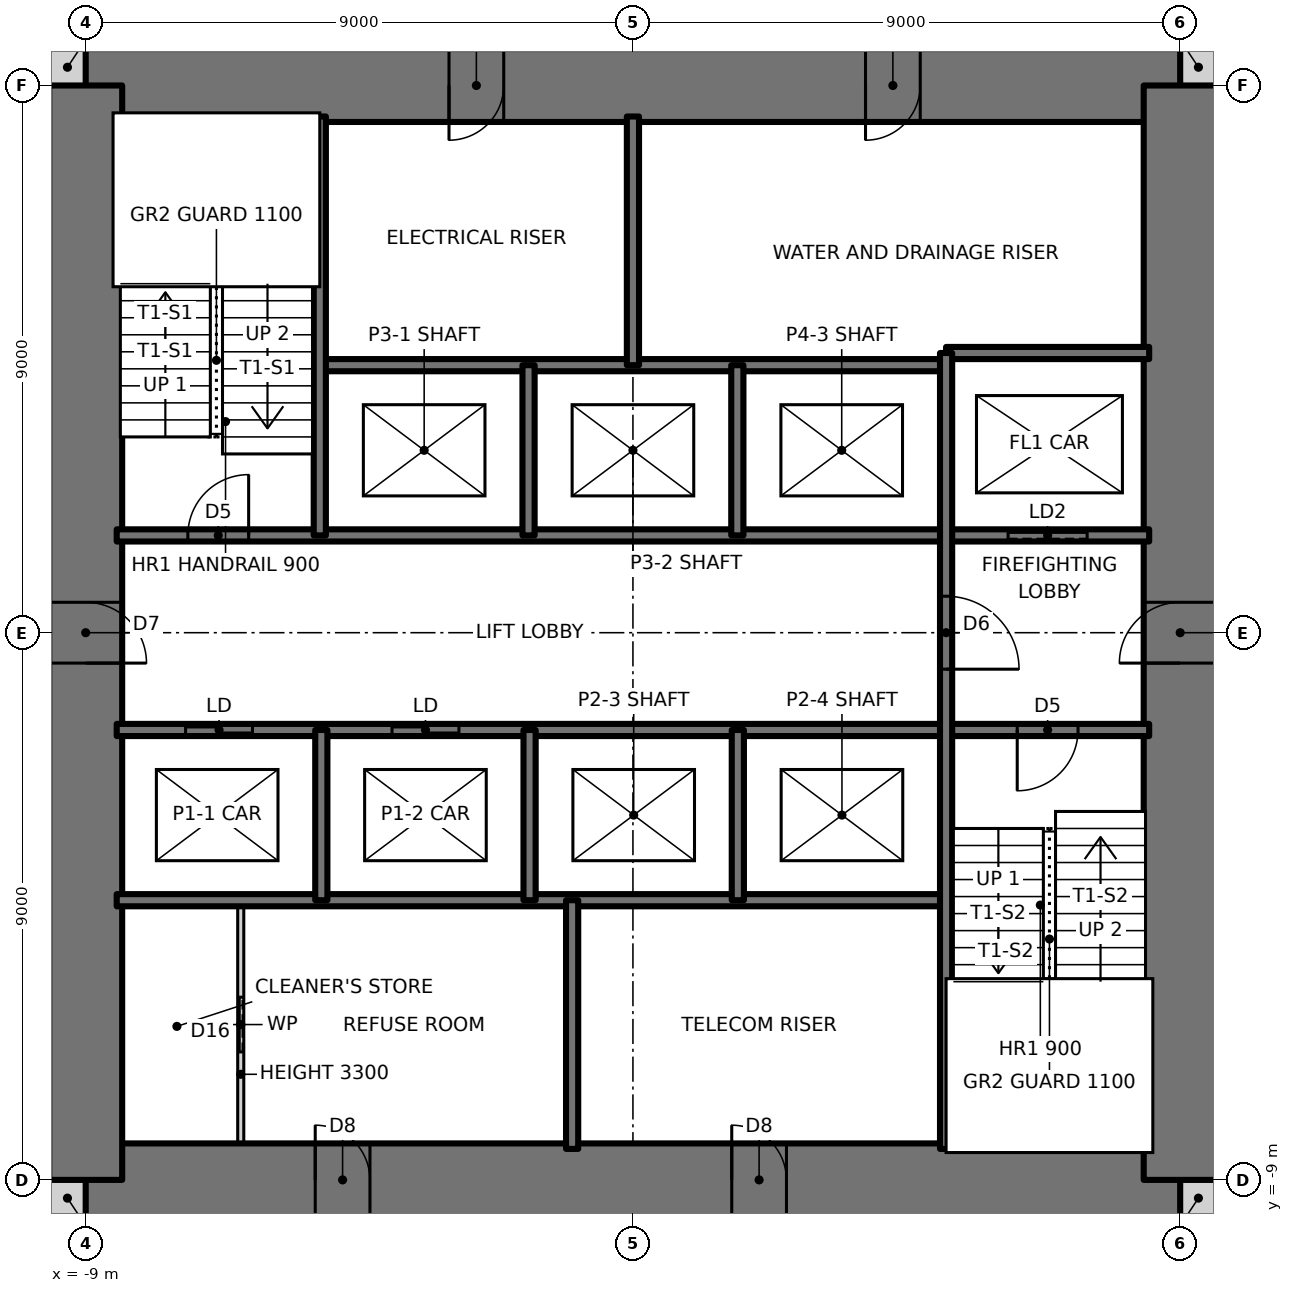
"""IFC4 building model, lengths in metres.
Left out: names, types, materials, properties, quantities, classifications, styles, units other than length and angle.
Written with IfcOpenShell. Run it as: python <this file> out.ifc"""

import sys

from ifc_helpers import new_model, si_unit, direction, frame, frame_2d, origin, place, context, subcontext, project, spatial, rectangle, extrude, element, fill, save


model = new_model("IFC4")
c1 = context("Model", 3, precision=1e-05, world=origin(), true_north=direction((0.0, 1.0)))
c2 = subcontext(c1, "Body", "Model", "MODEL_VIEW")
j1 = project(units=[si_unit("LENGTHUNIT", "METRE"), si_unit("PLANEANGLEUNIT", "RADIAN")], contexts=[c1])
p1 = place(None, origin())
s1 = spatial("IfcSite", under=j1, at=p1, CompositionType="ELEMENT")
p2 = place(p1, origin())
s2 = spatial("IfcBuilding", under=s1, at=p2, CompositionType="ELEMENT")
p3 = place(p2, frame((0.0, 0.0, 46.5)))
s3 = spatial("IfcBuildingStorey", under=s2, at=p3, CompositionType="ELEMENT", Elevation=46.5)
for number, where, z_axis, x_axis in (
    (1, (-9.6, -9.3, 0.0), (0.0, 0.0, 1.0), (1.0, 0.0, 0.0)),
    (2, (9.0, -9.3, 0.0), (0.0, 0.0, 1.0), (1.0, 0.0, 0.0)),
    (3, (9.0, 9.3, 0.0), (0.0, 0.0, 1.0), (1.0, 0.0, 0.0)),
    (4, (-9.6, 9.3, 0.0), (0.0, 0.0, 1.0), (1.0, 0.0, 0.0)),
):
    element("IfcWall", number, at=place(p3, frame(where, z_axis=z_axis, x_axis=x_axis)), inside=s3, PredefinedType="SOLIDWALL", context=c2, shape_type="SweptSolid", body=[
        extrude(rectangle(XDim=0.6, YDim=0.6, at=frame_2d((0.3, 0.0))), origin(), (0.0, 0.0, 1.0), 3.5),
    ])
p4 = place(p3, frame((-9.0, -9.0, 0.0), z_axis=(0.0, 0.0, 1.0), x_axis=(1.0, 0.0, 0.0)))
e5 = element("IfcWall", 5, at=p4, inside=s3, PredefinedType="SHEAR", context=c2, shape_type="SweptSolid", body=[
    extrude(rectangle(XDim=18.0, YDim=1.2, at=frame_2d((9.0, 0.0))), origin(), (0.0, 0.0, 1.0), 3.5),
])
p5 = place(p4, frame((3.775, 0.0, 0.0)))
e6 = element("IfcOpeningElement", 6, at=p5, cuts=e5, PredefinedType="OPENING", context=c2, shape_type="SweptSolid", body=[
    extrude(rectangle(XDim=0.9, YDim=2.1, at=frame_2d((0.45, 1.05))), frame((0.0, 0.61, 0.0), z_axis=(0.0, -1.0, 0.0), x_axis=(1.0, 0.0, 0.0)), (0.0, 0.0, 1.0), 1.22),
])
p6 = place(p4, frame((10.625, 0.0, 0.0)))
e7 = element("IfcOpeningElement", 7, at=p6, cuts=e5, PredefinedType="OPENING", context=c2, shape_type="SweptSolid", body=[
    extrude(rectangle(XDim=0.9, YDim=2.1, at=frame_2d((0.45, 1.05))), frame((0.0, 0.61, 0.0), z_axis=(0.0, -1.0, 0.0), x_axis=(1.0, 0.0, 0.0)), (0.0, 0.0, 1.0), 1.22),
])
p7 = place(p3, frame((9.0, 9.0, 0.0), z_axis=(0.0, 0.0, 1.0), x_axis=(-1.0, 0.0, 0.0)))
e8 = element("IfcWall", 8, at=p7, inside=s3, PredefinedType="SHEAR", context=c2, shape_type="SweptSolid", body=[
    extrude(rectangle(XDim=18.0, YDim=1.2, at=frame_2d((9.0, 0.0))), origin(), (0.0, 0.0, 1.0), 3.5),
])
p8 = place(p7, frame((11.125, 0.0, 0.0)))
e9 = element("IfcOpeningElement", 9, at=p8, cuts=e8, PredefinedType="OPENING", context=c2, shape_type="SweptSolid", body=[
    extrude(rectangle(XDim=0.9, YDim=2.1, at=frame_2d((0.45, 1.05))), frame((0.0, 0.61, 0.0), z_axis=(0.0, -1.0, 0.0), x_axis=(1.0, 0.0, 0.0)), (0.0, 0.0, 1.0), 1.22),
])
p9 = place(p7, frame((4.275, 0.0, 0.0)))
e10 = element("IfcOpeningElement", 10, at=p9, cuts=e8, PredefinedType="OPENING", context=c2, shape_type="SweptSolid", body=[
    extrude(rectangle(XDim=0.9, YDim=2.1, at=frame_2d((0.45, 1.05))), frame((0.0, 0.61, 0.0), z_axis=(0.0, -1.0, 0.0), x_axis=(1.0, 0.0, 0.0)), (0.0, 0.0, 1.0), 1.22),
])
p10 = place(p3, frame((9.0, -9.0, 0.0), z_axis=(0.0, 0.0, 1.0), x_axis=(0.0, 1.0, 0.0)))
e11 = element("IfcWall", 11, at=p10, inside=s3, PredefinedType="SHEAR", context=c2, shape_type="SweptSolid", body=[
    extrude(rectangle(XDim=18.0, YDim=1.2, at=frame_2d((9.0, 0.0))), origin(), (0.0, 0.0, 1.0), 3.5),
])
p11 = place(p10, frame((8.5, 0.0, 0.0)))
e12 = element("IfcOpeningElement", 12, at=p11, cuts=e11, PredefinedType="OPENING", context=c2, shape_type="SweptSolid", body=[
    extrude(rectangle(XDim=1.0, YDim=2.1, at=frame_2d((0.5, 1.05))), frame((0.0, 0.61, 0.0), z_axis=(0.0, -1.0, 0.0), x_axis=(1.0, 0.0, 0.0)), (0.0, 0.0, 1.0), 1.22),
])
p12 = place(p3, frame((-9.0, 9.0, 0.0), z_axis=(0.0, 0.0, 1.0), x_axis=(0.0, -1.0, 0.0)))
e13 = element("IfcWall", 13, at=p12, inside=s3, PredefinedType="SHEAR", context=c2, shape_type="SweptSolid", body=[
    extrude(rectangle(XDim=18.0, YDim=1.2, at=frame_2d((9.0, 0.0))), origin(), (0.0, 0.0, 1.0), 3.5),
])
p13 = place(p12, frame((8.5, 0.0, 0.0)))
e14 = element("IfcOpeningElement", 14, at=p13, cuts=e13, PredefinedType="OPENING", context=c2, shape_type="SweptSolid", body=[
    extrude(rectangle(XDim=1.0, YDim=2.1, at=frame_2d((0.5, 1.05))), frame((0.0, 0.61, 0.0), z_axis=(0.0, -1.0, 0.0), x_axis=(1.0, 0.0, 0.0)), (0.0, 0.0, 1.0), 1.22),
])
p14 = place(p3, frame((-8.49, -4.4, 0.0), z_axis=(0.0, 0.0, 1.0), x_axis=(1.0, 0.0, 0.0)))
e15 = element("IfcWall", 15, at=p14, inside=s3, PredefinedType="SOLIDWALL", context=c2, shape_type="SweptSolid", body=[
    extrude(rectangle(XDim=13.64, YDim=0.2, at=frame_2d((6.82, 0.0))), origin(), (0.0, 0.0, 1.0), 3.5),
])
p15 = place(p3, frame((-8.49, -1.6, 0.0), z_axis=(0.0, 0.0, 1.0), x_axis=(1.0, 0.0, 0.0)))
e16 = element("IfcWall", 16, at=p15, inside=s3, PredefinedType="SOLIDWALL", context=c2, shape_type="SweptSolid", body=[
    extrude(rectangle(XDim=16.98, YDim=0.2, at=frame_2d((8.49, 0.0))), origin(), (0.0, 0.0, 1.0), 3.5),
])
p16 = place(p15, frame((14.81, 0.0, 0.0)))
e17 = element("IfcOpeningElement", 17, at=p16, cuts=e16, PredefinedType="OPENING", context=c2, shape_type="SweptSolid", body=[
    extrude(rectangle(XDim=1.0, YDim=2.1, at=frame_2d((0.5, 1.05))), frame((0.0, 0.11, 0.0), z_axis=(0.0, -1.0, 0.0), x_axis=(1.0, 0.0, 0.0)), (0.0, 0.0, 1.0), 0.22),
])
p17 = place(p15, frame((1.133, 0.0, 0.0)))
e18 = element("IfcOpeningElement", 18, at=p17, cuts=e16, PredefinedType="OPENING", context=c2, shape_type="SweptSolid", body=[
    extrude(rectangle(XDim=1.1, YDim=2.1, at=frame_2d((0.55, 1.05))), frame((0.0, 0.11, 0.0), z_axis=(0.0, -1.0, 0.0), x_axis=(1.0, 0.0, 0.0)), (0.0, 0.0, 1.0), 0.22),
])
p18 = place(p15, frame((4.528, 0.0, 0.0)))
e19 = element("IfcOpeningElement", 19, at=p18, cuts=e16, PredefinedType="OPENING", context=c2, shape_type="SweptSolid", body=[
    extrude(rectangle(XDim=1.1, YDim=2.1, at=frame_2d((0.55, 1.05))), frame((0.0, 0.11, 0.0), z_axis=(0.0, -1.0, 0.0), x_axis=(1.0, 0.0, 0.0)), (0.0, 0.0, 1.0), 0.22),
])
p19 = place(p3, frame((-8.49, 1.6, 0.0), z_axis=(0.0, 0.0, 1.0), x_axis=(1.0, 0.0, 0.0)))
e20 = element("IfcWall", 20, at=p19, inside=s3, PredefinedType="SOLIDWALL", context=c2, shape_type="SweptSolid", body=[
    extrude(rectangle(XDim=16.98, YDim=0.2, at=frame_2d((8.49, 0.0))), origin(), (0.0, 0.0, 1.0), 3.5),
])
p20 = place(p19, frame((1.17, 0.0, 0.0)))
e21 = element("IfcOpeningElement", 21, at=p20, cuts=e20, PredefinedType="OPENING", context=c2, shape_type="SweptSolid", body=[
    extrude(rectangle(XDim=1.0, YDim=2.1, at=frame_2d((0.5, 1.05))), frame((0.0, 0.11, 0.0), z_axis=(0.0, -1.0, 0.0), x_axis=(1.0, 0.0, 0.0)), (0.0, 0.0, 1.0), 0.22),
])
p21 = place(p19, frame((14.66, 0.0, 0.0)))
e22 = element("IfcOpeningElement", 22, at=p21, cuts=e20, PredefinedType="OPENING", context=c2, shape_type="SweptSolid", body=[
    extrude(rectangle(XDim=1.3, YDim=2.1, at=frame_2d((0.65, 1.05))), frame((0.0, 0.11, 0.0), z_axis=(0.0, -1.0, 0.0), x_axis=(1.0, 0.0, 0.0)), (0.0, 0.0, 1.0), 0.22),
])
p22 = place(p3, frame((-5.15, 4.4, 0.0), z_axis=(0.0, 0.0, 1.0), x_axis=(1.0, 0.0, 0.0)))
e23 = element("IfcWall", 23, at=p22, inside=s3, PredefinedType="SOLIDWALL", context=c2, shape_type="SweptSolid", body=[
    extrude(rectangle(XDim=10.3, YDim=0.2, at=frame_2d((5.15, 0.0))), origin(), (0.0, 0.0, 1.0), 3.5),
])
p23 = place(p3, frame((5.15, 4.6, 0.0), z_axis=(0.0, 0.0, 1.0), x_axis=(1.0, 0.0, 0.0)))
e24 = element("IfcWall", 24, at=p23, inside=s3, PredefinedType="SOLIDWALL", context=c2, shape_type="SweptSolid", body=[
    extrude(rectangle(XDim=3.34, YDim=0.2, at=frame_2d((1.67, 0.0))), origin(), (0.0, 0.0, 1.0), 3.5),
])
p24 = place(p3, frame((5.15, -8.49, 0.0), z_axis=(0.0, 0.0, 1.0), x_axis=(0.0, 1.0, 0.0)))
e25 = element("IfcWall", 25, at=p24, inside=s3, PredefinedType="SOLIDWALL", context=c2, shape_type="SweptSolid", body=[
    extrude(rectangle(XDim=13.09, YDim=0.2, at=frame_2d((6.545, 0.0))), origin(), (0.0, 0.0, 1.0), 3.5),
])
p25 = place(p24, frame((7.89, 0.0, 0.0)))
e26 = element("IfcOpeningElement", 26, at=p25, cuts=e25, PredefinedType="OPENING", context=c2, shape_type="SweptSolid", body=[
    extrude(rectangle(XDim=1.2, YDim=2.1, at=frame_2d((0.6, 1.05))), frame((0.0, 0.11, 0.0), z_axis=(0.0, -1.0, 0.0), x_axis=(1.0, 0.0, 0.0)), (0.0, 0.0, 1.0), 0.22),
])
for number, where, z_axis, x_axis in (
    (27, (1.725, -4.4, 0.0), (0.0, 0.0, 1.0), (0.0, 1.0, 0.0)),
    (28, (1.717, 1.6, 0.0), (0.0, 0.0, 1.0), (0.0, 1.0, 0.0)),
):
    element("IfcWall", number, at=place(p3, frame(where, z_axis=z_axis, x_axis=x_axis)), inside=s3, PredefinedType="SOLIDWALL", context=c2, shape_type="SweptSolid", body=[
        extrude(rectangle(XDim=2.8, YDim=0.2, at=frame_2d((1.4, 0.0))), origin(), (0.0, 0.0, 1.0), 3.5),
    ])
for number, where, z_axis, x_axis in (
    (29, (0.0, 4.4, 0.0), (0.0, 0.0, 1.0), (0.0, 1.0, 0.0)),
    (30, (-1.0, -8.49, 0.0), (0.0, 0.0, 1.0), (0.0, 1.0, 0.0)),
):
    element("IfcWall", number, at=place(p3, frame(where, z_axis=z_axis, x_axis=x_axis)), inside=s3, PredefinedType="SOLIDWALL", context=c2, shape_type="SweptSolid", body=[
        extrude(rectangle(XDim=4.09, YDim=0.2, at=frame_2d((2.045, 0.0))), origin(), (0.0, 0.0, 1.0), 3.5),
    ])
for number, where, z_axis, x_axis in (
    (31, (-1.7, -4.4, 0.0), (0.0, 0.0, 1.0), (0.0, 1.0, 0.0)),
    (32, (-1.717, 1.6, 0.0), (0.0, 0.0, 1.0), (0.0, 1.0, 0.0)),
    (33, (-5.125, -4.4, 0.0), (0.0, 0.0, 1.0), (0.0, 1.0, 0.0)),
):
    element("IfcWall", number, at=place(p3, frame(where, z_axis=z_axis, x_axis=x_axis)), inside=s3, PredefinedType="SOLIDWALL", context=c2, shape_type="SweptSolid", body=[
        extrude(rectangle(XDim=2.8, YDim=0.2, at=frame_2d((1.4, 0.0))), origin(), (0.0, 0.0, 1.0), 3.5),
    ])
p26 = place(p3, frame((-5.15, 1.6, 0.0), z_axis=(0.0, 0.0, 1.0), x_axis=(0.0, 1.0, 0.0)))
e34 = element("IfcWall", 34, at=p26, inside=s3, PredefinedType="SOLIDWALL", context=c2, shape_type="SweptSolid", body=[
    extrude(rectangle(XDim=6.89, YDim=0.2, at=frame_2d((3.445, 0.0))), origin(), (0.0, 0.0, 1.0), 3.5),
])
p27 = place(p3, frame((-6.45, -8.49, 0.0), z_axis=(0.0, 0.0, 1.0), x_axis=(0.0, 1.0, 0.0)))
e35 = element("IfcWall", 35, at=p27, inside=s3, PredefinedType="PARTITIONING", context=c2, shape_type="SweptSolid", body=[
    extrude(rectangle(XDim=4.09, YDim=0.1, at=frame_2d((2.045, 0.0))), origin(), (0.0, 0.0, 1.0), 3.3),
])
p28 = place(p27, frame((1.595, 0.0, 0.0)))
e36 = element("IfcOpeningElement", 36, at=p28, cuts=e35, PredefinedType="OPENING", context=c2, shape_type="SweptSolid", body=[
    extrude(rectangle(XDim=0.9, YDim=2.1, at=frame_2d((0.45, 1.05))), frame((0.0, 0.06, 0.0), z_axis=(0.0, -1.0, 0.0), x_axis=(1.0, 0.0, 0.0)), (0.0, 0.0, 1.0), 0.12),
])
p29 = place(p20, origin())
e37 = element("IfcDoor", 37, at=p29, inside=s3, OperationType="SINGLE_SWING_RIGHT", PredefinedType="DOOR", context=c2, shape_type="SweptSolid", body=[
    extrude(rectangle(XDim=1.0, YDim=2.1, at=frame_2d((0.5, 1.05))), frame((0.0, 0.025, 0.0), z_axis=(0.0, -1.0, 0.0), x_axis=(1.0, 0.0, 0.0)), (0.0, 0.0, 1.0), 0.05),
])
fill(e21, e37)
p30 = place(p16, frame((1.0, 0.0, 0.0), z_axis=(0.0, 0.0, 1.0), x_axis=(-1.0, 0.0, 0.0)))
e38 = element("IfcDoor", 38, at=p30, inside=s3, OperationType="SINGLE_SWING_RIGHT", PredefinedType="DOOR", context=c2, shape_type="SweptSolid", body=[
    extrude(rectangle(XDim=1.0, YDim=2.1, at=frame_2d((0.5, 1.05))), frame((0.0, 0.025, 0.0), z_axis=(0.0, -1.0, 0.0), x_axis=(1.0, 0.0, 0.0)), (0.0, 0.0, 1.0), 0.05),
])
fill(e17, e38)
p31 = place(p25, frame((1.2, 0.0, 0.0), z_axis=(0.0, 0.0, 1.0), x_axis=(-1.0, 0.0, 0.0)))
e39 = element("IfcDoor", 39, at=p31, inside=s3, OperationType="SINGLE_SWING_RIGHT", PredefinedType="DOOR", context=c2, shape_type="SweptSolid", body=[
    extrude(rectangle(XDim=1.2, YDim=2.1, at=frame_2d((0.6, 1.05))), frame((0.0, 0.025, 0.0), z_axis=(0.0, -1.0, 0.0), x_axis=(1.0, 0.0, 0.0)), (0.0, 0.0, 1.0), 0.05),
])
fill(e26, e39)
p32 = place(p28, origin())
e40 = element("IfcDoor", 40, at=p32, inside=s3, OperationType="SLIDING_TO_LEFT", PredefinedType="DOOR", context=c2, shape_type="SweptSolid", body=[
    extrude(rectangle(XDim=0.9, YDim=2.1, at=frame_2d((0.45, 1.05))), frame((0.0, 0.025, 0.0), z_axis=(0.0, -1.0, 0.0), x_axis=(1.0, 0.0, 0.0)), (0.0, 0.0, 1.0), 0.05),
])
fill(e36, e40)
p33 = place(p13, origin())
e41 = element("IfcDoor", 41, at=p33, inside=s3, OperationType="SINGLE_SWING_RIGHT", PredefinedType="DOOR", context=c2, shape_type="SweptSolid", body=[
    extrude(rectangle(XDim=1.0, YDim=2.1, at=frame_2d((0.5, 1.05))), frame((0.0, 0.025, 0.0), z_axis=(0.0, -1.0, 0.0), x_axis=(1.0, 0.0, 0.0)), (0.0, 0.0, 1.0), 0.05),
])
fill(e14, e41)
p34 = place(p11, origin())
e42 = element("IfcDoor", 42, at=p34, inside=s3, OperationType="SINGLE_SWING_LEFT", PredefinedType="DOOR", context=c2, shape_type="SweptSolid", body=[
    extrude(rectangle(XDim=1.0, YDim=2.1, at=frame_2d((0.5, 1.05))), frame((0.0, 0.025, 0.0), z_axis=(0.0, -1.0, 0.0), x_axis=(1.0, 0.0, 0.0)), (0.0, 0.0, 1.0), 0.05),
])
fill(e12, e42)
p35 = place(p8, origin())
e43 = element("IfcDoor", 43, at=p35, inside=s3, OperationType="SINGLE_SWING_RIGHT", PredefinedType="DOOR", context=c2, shape_type="SweptSolid", body=[
    extrude(rectangle(XDim=0.9, YDim=2.1, at=frame_2d((0.45, 1.05))), frame((0.0, 0.025, 0.0), z_axis=(0.0, -1.0, 0.0), x_axis=(1.0, 0.0, 0.0)), (0.0, 0.0, 1.0), 0.05),
])
fill(e9, e43)
p36 = place(p9, origin())
e44 = element("IfcDoor", 44, at=p36, inside=s3, OperationType="SINGLE_SWING_RIGHT", PredefinedType="DOOR", context=c2, shape_type="SweptSolid", body=[
    extrude(rectangle(XDim=0.9, YDim=2.1, at=frame_2d((0.45, 1.05))), frame((0.0, 0.025, 0.0), z_axis=(0.0, -1.0, 0.0), x_axis=(1.0, 0.0, 0.0)), (0.0, 0.0, 1.0), 0.05),
])
fill(e10, e44)
p37 = place(p5, origin())
e45 = element("IfcDoor", 45, at=p37, inside=s3, OperationType="SINGLE_SWING_LEFT", PredefinedType="DOOR", context=c2, shape_type="SweptSolid", body=[
    extrude(rectangle(XDim=0.9, YDim=2.1, at=frame_2d((0.45, 1.05))), frame((0.0, 0.025, 0.0), z_axis=(0.0, -1.0, 0.0), x_axis=(1.0, 0.0, 0.0)), (0.0, 0.0, 1.0), 0.05),
])
fill(e6, e45)
p38 = place(p6, origin())
e46 = element("IfcDoor", 46, at=p38, inside=s3, OperationType="SINGLE_SWING_LEFT", PredefinedType="DOOR", context=c2, shape_type="SweptSolid", body=[
    extrude(rectangle(XDim=0.9, YDim=2.1, at=frame_2d((0.45, 1.05))), frame((0.0, 0.025, 0.0), z_axis=(0.0, -1.0, 0.0), x_axis=(1.0, 0.0, 0.0)), (0.0, 0.0, 1.0), 0.05),
])
fill(e7, e46)
p39 = place(p17, origin())
e47 = element("IfcDoor", 47, at=p39, inside=s3, OperationType="DOUBLE_DOOR_SLIDING", PredefinedType="DOOR", context=c2, shape_type="SweptSolid", body=[
    extrude(rectangle(XDim=1.1, YDim=2.1, at=frame_2d((0.55, 1.05))), frame((0.0, 0.025, 0.0), z_axis=(0.0, -1.0, 0.0), x_axis=(1.0, 0.0, 0.0)), (0.0, 0.0, 1.0), 0.05),
])
fill(e18, e47)
p40 = place(p18, origin())
e48 = element("IfcDoor", 48, at=p40, inside=s3, OperationType="DOUBLE_DOOR_SLIDING", PredefinedType="DOOR", context=c2, shape_type="SweptSolid", body=[
    extrude(rectangle(XDim=1.1, YDim=2.1, at=frame_2d((0.55, 1.05))), frame((0.0, 0.025, 0.0), z_axis=(0.0, -1.0, 0.0), x_axis=(1.0, 0.0, 0.0)), (0.0, 0.0, 1.0), 0.05),
])
fill(e19, e48)
p41 = place(p21, origin())
e49 = element("IfcDoor", 49, at=p41, inside=s3, OperationType="SLIDING_TO_LEFT", PredefinedType="DOOR", context=c2, shape_type="SweptSolid", body=[
    extrude(rectangle(XDim=1.3, YDim=2.1, at=frame_2d((0.65, 1.05))), frame((0.0, 0.025, 0.0), z_axis=(0.0, -1.0, 0.0), x_axis=(1.0, 0.0, 0.0)), (0.0, 0.0, 1.0), 0.05),
])
fill(e22, e49)
save(model, sys.argv[1])
